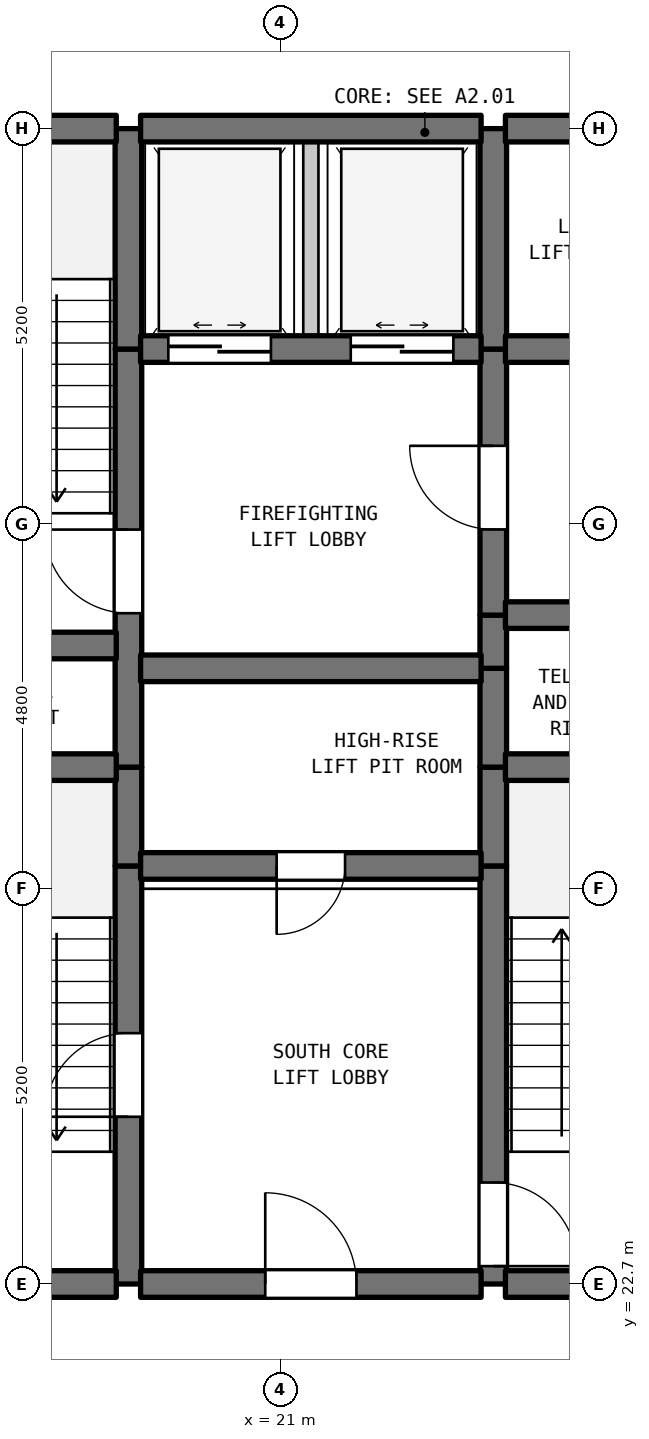
"""IFC4 building model, lengths in metres.
Left out: names, types, materials, properties, quantities, classifications, styles, units other than length and angle.
Written with IfcOpenShell. Run it as: python <this file> out.ifc"""

import sys

from ifc_helpers import new_model, si_unit, direction, frame, frame_2d, origin, place, context, subcontext, project, spatial, rectangle, extrude, element, fill, save


model = new_model("IFC4")
c1 = context("Model", 3, precision=1e-05, world=origin(), true_north=direction((0.0, 1.0)))
c2 = subcontext(c1, "Body", "Model", "MODEL_VIEW")
j1 = project(units=[si_unit("LENGTHUNIT", "METRE"), si_unit("PLANEANGLEUNIT", "RADIAN")], contexts=[c1])
p1 = place(None, origin())
s1 = spatial("IfcSite", under=j1, at=p1, CompositionType="ELEMENT")
p2 = place(p1, origin())
s2 = spatial("IfcBuilding", under=s1, at=p2, CompositionType="ELEMENT")
p3 = place(p2, frame((0.0, 0.0, -9.0)))
s3 = spatial("IfcBuildingStorey", under=s2, at=p3, CompositionType="ELEMENT", Elevation=-9.0)
p4 = place(p3, frame((19.0, 22.7, 0.0), z_axis=(0.0, 0.0, 1.0), x_axis=(0.0, 1.0, 0.0)))
e1 = element("IfcWall", 1, at=p4, inside=s3, PredefinedType="SHEAR", context=c2, shape_type="SweptSolid", body=[
    extrude(rectangle(XDim=5.5, YDim=0.35, at=frame_2d((2.75, 0.0))), origin(), (0.0, 0.0, 1.0), 4.16),
])
p5 = place(p4, frame((2.2, 0.0, 0.0)))
e2 = element("IfcOpeningElement", 2, at=p5, cuts=e1, PredefinedType="OPENING", context=c2, shape_type="SweptSolid", body=[
    extrude(rectangle(XDim=1.1, YDim=2.15, at=frame_2d((0.55, 1.075))), frame((0.0, 0.185, 0.0), z_axis=(0.0, -1.0, 0.0), x_axis=(1.0, 0.0, 0.0)), (0.0, 0.0, 1.0), 0.37),
])
p6 = place(p3, frame((19.0, 28.2, 0.0), z_axis=(0.0, 0.0, 1.0), x_axis=(0.0, 1.0, 0.0)))
e3 = element("IfcWall", 3, at=p6, inside=s3, PredefinedType="SHEAR", context=c2, shape_type="SweptSolid", body=[
    extrude(rectangle(XDim=1.3, YDim=0.35, at=frame_2d((0.65, 0.0))), origin(), (0.0, 0.0, 1.0), 4.16),
])
p7 = place(p3, frame((19.0, 29.5, 0.0), z_axis=(0.0, 0.0, 1.0), x_axis=(0.0, 1.0, 0.0)))
e4 = element("IfcWall", 4, at=p7, inside=s3, PredefinedType="SHEAR", context=c2, shape_type="SweptSolid", body=[
    extrude(rectangle(XDim=5.5, YDim=0.35, at=frame_2d((2.75, 0.0))), origin(), (0.0, 0.0, 1.0), 4.16),
])
p8 = place(p7, frame((2.025, 0.0, 0.0)))
e5 = element("IfcOpeningElement", 5, at=p8, cuts=e4, PredefinedType="OPENING", context=c2, shape_type="SweptSolid", body=[
    extrude(rectangle(XDim=1.1, YDim=2.15, at=frame_2d((0.55, 1.075))), frame((0.0, 0.185, 0.0), z_axis=(0.0, -1.0, 0.0), x_axis=(1.0, 0.0, 0.0)), (0.0, 0.0, 1.0), 0.37),
])
p9 = place(p3, frame((19.0, 35.0, 0.0), z_axis=(0.0, 0.0, 1.0), x_axis=(0.0, 1.0, 0.0)))
e6 = element("IfcWall", 6, at=p9, inside=s3, PredefinedType="SHEAR", context=c2, shape_type="SweptSolid", body=[
    extrude(rectangle(XDim=2.9, YDim=0.35, at=frame_2d((1.45, 0.0))), origin(), (0.0, 0.0, 1.0), 4.16),
])
p10 = place(p3, frame((21.4, 35.0, 0.0), z_axis=(0.0, 0.0, 1.0), x_axis=(0.0, 1.0, 0.0)))
e7 = element("IfcWall", 7, at=p10, inside=s3, PredefinedType="STANDARD", context=c2, shape_type="SweptSolid", body=[
    extrude(rectangle(XDim=2.9, YDim=0.2, at=frame_2d((1.45, 0.0))), origin(), (0.0, 0.0, 1.0), 4.16),
])
p11 = place(p3, frame((23.8, 22.7, 0.0), z_axis=(0.0, 0.0, 1.0), x_axis=(0.0, 1.0, 0.0)))
e8 = element("IfcWall", 8, at=p11, inside=s3, PredefinedType="SHEAR", context=c2, shape_type="SweptSolid", body=[
    extrude(rectangle(XDim=5.5, YDim=0.35, at=frame_2d((2.75, 0.0))), origin(), (0.0, 0.0, 1.0), 4.16),
])
p12 = place(p11, frame((0.235, 0.0, 0.0)))
e9 = element("IfcOpeningElement", 9, at=p12, cuts=e8, PredefinedType="OPENING", context=c2, shape_type="SweptSolid", body=[
    extrude(rectangle(XDim=1.1, YDim=2.15, at=frame_2d((0.55, 1.075))), frame((0.0, 0.185, 0.0), z_axis=(0.0, -1.0, 0.0), x_axis=(1.0, 0.0, 0.0)), (0.0, 0.0, 1.0), 0.37),
])
for number, where, z_axis, x_axis in (
    (10, (23.8, 28.2, 0.0), (0.0, 0.0, 1.0), (0.0, 1.0, 0.0)),
    (11, (23.8, 29.5, 0.0), (0.0, 0.0, 1.0), (0.0, 1.0, 0.0)),
):
    element("IfcWall", number, at=place(p3, frame(where, z_axis=z_axis, x_axis=x_axis)), inside=s3, PredefinedType="SHEAR", context=c2, shape_type="SweptSolid", body=[
        extrude(rectangle(XDim=1.3, YDim=0.35, at=frame_2d((0.65, 0.0))), origin(), (0.0, 0.0, 1.0), 4.16),
    ])
p13 = place(p3, frame((23.8, 30.8, 0.0), z_axis=(0.0, 0.0, 1.0), x_axis=(0.0, 1.0, 0.0)))
e12 = element("IfcWall", 12, at=p13, inside=s3, PredefinedType="SHEAR", context=c2, shape_type="SweptSolid", body=[
    extrude(rectangle(XDim=0.7, YDim=0.35, at=frame_2d((0.35, 0.0))), origin(), (0.0, 0.0, 1.0), 4.16),
])
p14 = place(p3, frame((23.8, 31.5, 0.0), z_axis=(0.0, 0.0, 1.0), x_axis=(0.0, 1.0, 0.0)))
e13 = element("IfcWall", 13, at=p14, inside=s3, PredefinedType="SHEAR", context=c2, shape_type="SweptSolid", body=[
    extrude(rectangle(XDim=3.5, YDim=0.35, at=frame_2d((1.75, 0.0))), origin(), (0.0, 0.0, 1.0), 4.16),
])
p15 = place(p14, frame((1.127, 0.0, 0.0)))
e14 = element("IfcOpeningElement", 14, at=p15, cuts=e13, PredefinedType="OPENING", context=c2, shape_type="SweptSolid", body=[
    extrude(rectangle(XDim=1.1, YDim=2.15, at=frame_2d((0.55, 1.075))), frame((0.0, 0.185, 0.0), z_axis=(0.0, -1.0, 0.0), x_axis=(1.0, 0.0, 0.0)), (0.0, 0.0, 1.0), 0.37),
])
p16 = place(p3, frame((23.8, 35.0, 0.0), z_axis=(0.0, 0.0, 1.0), x_axis=(0.0, 1.0, 0.0)))
e15 = element("IfcWall", 15, at=p16, inside=s3, PredefinedType="SHEAR", context=c2, shape_type="SweptSolid", body=[
    extrude(rectangle(XDim=2.9, YDim=0.35, at=frame_2d((1.45, 0.0))), origin(), (0.0, 0.0, 1.0), 4.16),
])
p17 = place(p3, frame((15.16, 22.7, 0.0), z_axis=(0.0, 0.0, 1.0), x_axis=(1.0, 0.0, 0.0)))
e16 = element("IfcWall", 16, at=p17, inside=s3, PredefinedType="SHEAR", context=c2, shape_type="SweptSolid", body=[
    extrude(rectangle(XDim=3.68, YDim=0.35, at=frame_2d((1.84, 0.0))), origin(), (0.0, 0.0, 1.0), 4.16),
])
p18 = place(p3, frame((19.16, 22.7, 0.0), z_axis=(0.0, 0.0, 1.0), x_axis=(1.0, 0.0, 0.0)))
e17 = element("IfcWall", 17, at=p18, inside=s3, PredefinedType="SHEAR", context=c2, shape_type="SweptSolid", body=[
    extrude(rectangle(XDim=4.48, YDim=0.35, at=frame_2d((2.24, 0.0))), origin(), (0.0, 0.0, 1.0), 4.16),
])
p19 = place(p18, frame((1.64, 0.0, 0.0)))
e18 = element("IfcOpeningElement", 18, at=p19, cuts=e17, PredefinedType="OPENING", context=c2, shape_type="SweptSolid", body=[
    extrude(rectangle(XDim=1.2, YDim=2.2, at=frame_2d((0.6, 1.1))), frame((0.0, 0.185, 0.0), z_axis=(0.0, -1.0, 0.0), x_axis=(1.0, 0.0, 0.0)), (0.0, 0.0, 1.0), 0.37),
])
p20 = place(p3, frame((23.96, 22.7, 0.0), z_axis=(0.0, 0.0, 1.0), x_axis=(1.0, 0.0, 0.0)))
e19 = element("IfcWall", 19, at=p20, inside=s3, PredefinedType="SHEAR", context=c2, shape_type="SweptSolid", body=[
    extrude(rectangle(XDim=3.18, YDim=0.35, at=frame_2d((1.59, 0.0))), origin(), (0.0, 0.0, 1.0), 4.16),
])
p21 = place(p3, frame((19.16, 28.2, 0.0), z_axis=(0.0, 0.0, 1.0), x_axis=(1.0, 0.0, 0.0)))
e20 = element("IfcWall", 20, at=p21, inside=s3, PredefinedType="SHEAR", context=c2, shape_type="SweptSolid", body=[
    extrude(rectangle(XDim=4.48, YDim=0.35, at=frame_2d((2.24, 0.0))), origin(), (0.0, 0.0, 1.0), 4.16),
])
p22 = place(p21, frame((1.79, 0.0, 0.0)))
e21 = element("IfcOpeningElement", 21, at=p22, cuts=e20, PredefinedType="OPENING", context=c2, shape_type="SweptSolid", body=[
    extrude(rectangle(XDim=0.9, YDim=2.15, at=frame_2d((0.45, 1.075))), frame((0.0, 0.185, 0.0), z_axis=(0.0, -1.0, 0.0), x_axis=(1.0, 0.0, 0.0)), (0.0, 0.0, 1.0), 0.37),
])
p23 = place(p3, frame((15.16, 29.5, 0.0), z_axis=(0.0, 0.0, 1.0), x_axis=(1.0, 0.0, 0.0)))
e22 = element("IfcWall", 22, at=p23, inside=s3, PredefinedType="SHEAR", context=c2, shape_type="SweptSolid", body=[
    extrude(rectangle(XDim=3.68, YDim=0.35, at=frame_2d((1.84, 0.0))), origin(), (0.0, 0.0, 1.0), 4.16),
])
p24 = place(p3, frame((23.96, 29.5, 0.0), z_axis=(0.0, 0.0, 1.0), x_axis=(1.0, 0.0, 0.0)))
e23 = element("IfcWall", 23, at=p24, inside=s3, PredefinedType="SHEAR", context=c2, shape_type="SweptSolid", body=[
    extrude(rectangle(XDim=3.18, YDim=0.35, at=frame_2d((1.59, 0.0))), origin(), (0.0, 0.0, 1.0), 4.16),
])
p25 = place(p3, frame((19.16, 30.8, 0.0), z_axis=(0.0, 0.0, 1.0), x_axis=(1.0, 0.0, 0.0)))
e24 = element("IfcWall", 24, at=p25, inside=s3, PredefinedType="SHEAR", context=c2, shape_type="SweptSolid", body=[
    extrude(rectangle(XDim=4.48, YDim=0.35, at=frame_2d((2.24, 0.0))), origin(), (0.0, 0.0, 1.0), 4.16),
])
p26 = place(p3, frame((15.16, 31.1, 0.0), z_axis=(0.0, 0.0, 1.0), x_axis=(1.0, 0.0, 0.0)))
e25 = element("IfcWall", 25, at=p26, inside=s3, PredefinedType="SHEAR", context=c2, shape_type="SweptSolid", body=[
    extrude(rectangle(XDim=3.68, YDim=0.35, at=frame_2d((1.84, 0.0))), origin(), (0.0, 0.0, 1.0), 4.16),
])
p27 = place(p3, frame((23.96, 31.5, 0.0), z_axis=(0.0, 0.0, 1.0), x_axis=(1.0, 0.0, 0.0)))
e26 = element("IfcWall", 26, at=p27, inside=s3, PredefinedType="SHEAR", context=c2, shape_type="SweptSolid", body=[
    extrude(rectangle(XDim=6.68, YDim=0.35, at=frame_2d((3.34, 0.0))), origin(), (0.0, 0.0, 1.0), 4.16),
])
p28 = place(p27, frame((1.24, 0.0, 0.0)))
e27 = element("IfcOpeningElement", 27, at=p28, cuts=e26, PredefinedType="OPENING", context=c2, shape_type="SweptSolid", body=[
    extrude(rectangle(XDim=0.85, YDim=2.1, at=frame_2d((0.425, 1.05))), frame((0.0, 0.185, 0.0), z_axis=(0.0, -1.0, 0.0), x_axis=(1.0, 0.0, 0.0)), (0.0, 0.0, 1.0), 0.37),
])
p29 = place(p3, frame((19.16, 35.0, 0.0), z_axis=(0.0, 0.0, 1.0), x_axis=(1.0, 0.0, 0.0)))
e28 = element("IfcWall", 28, at=p29, inside=s3, PredefinedType="SHEAR", context=c2, shape_type="SweptSolid", body=[
    extrude(rectangle(XDim=4.48, YDim=0.35, at=frame_2d((2.24, 0.0))), origin(), (0.0, 0.0, 1.0), 4.16),
])
p30 = place(p29, frame((0.365, 0.0, 0.0)))
e29 = element("IfcOpeningElement", 29, at=p30, cuts=e28, PredefinedType="OPENING", context=c2, shape_type="SweptSolid", body=[
    extrude(rectangle(XDim=1.35, YDim=2.2, at=frame_2d((0.675, 1.1))), frame((0.0, 0.185, 0.0), z_axis=(0.0, -1.0, 0.0), x_axis=(1.0, 0.0, 0.0)), (0.0, 0.0, 1.0), 0.37),
])
p31 = place(p29, frame((2.765, 0.0, 0.0)))
e30 = element("IfcOpeningElement", 30, at=p31, cuts=e28, PredefinedType="OPENING", context=c2, shape_type="SweptSolid", body=[
    extrude(rectangle(XDim=1.35, YDim=2.2, at=frame_2d((0.675, 1.1))), frame((0.0, 0.185, 0.0), z_axis=(0.0, -1.0, 0.0), x_axis=(1.0, 0.0, 0.0)), (0.0, 0.0, 1.0), 0.37),
])
p32 = place(p3, frame((23.96, 35.0, 0.0), z_axis=(0.0, 0.0, 1.0), x_axis=(1.0, 0.0, 0.0)))
e31 = element("IfcWall", 31, at=p32, inside=s3, PredefinedType="SHEAR", context=c2, shape_type="SweptSolid", body=[
    extrude(rectangle(XDim=6.68, YDim=0.35, at=frame_2d((3.34, 0.0))), origin(), (0.0, 0.0, 1.0), 4.16),
])
p33 = place(p32, frame((2.794, 0.0, 0.0)))
e32 = element("IfcOpeningElement", 32, at=p33, cuts=e31, PredefinedType="OPENING", context=c2, shape_type="SweptSolid", body=[
    extrude(rectangle(XDim=0.95, YDim=2.15, at=frame_2d((0.475, 1.075))), frame((0.0, 0.185, 0.0), z_axis=(0.0, -1.0, 0.0), x_axis=(1.0, 0.0, 0.0)), (0.0, 0.0, 1.0), 0.37),
])
p34 = place(p3, frame((15.16, 37.9, 0.0), z_axis=(0.0, 0.0, 1.0), x_axis=(1.0, 0.0, 0.0)))
e33 = element("IfcWall", 33, at=p34, inside=s3, PredefinedType="SHEAR", context=c2, shape_type="SweptSolid", body=[
    extrude(rectangle(XDim=3.68, YDim=0.35, at=frame_2d((1.84, 0.0))), origin(), (0.0, 0.0, 1.0), 4.16),
])
p35 = place(p3, frame((19.16, 37.9, 0.0), z_axis=(0.0, 0.0, 1.0), x_axis=(1.0, 0.0, 0.0)))
e34 = element("IfcWall", 34, at=p35, inside=s3, PredefinedType="SHEAR", context=c2, shape_type="SweptSolid", body=[
    extrude(rectangle(XDim=4.48, YDim=0.35, at=frame_2d((2.24, 0.0))), origin(), (0.0, 0.0, 1.0), 4.16),
])
p36 = place(p3, frame((23.96, 37.9, 0.0), z_axis=(0.0, 0.0, 1.0), x_axis=(1.0, 0.0, 0.0)))
e35 = element("IfcWall", 35, at=p36, inside=s3, PredefinedType="SHEAR", context=c2, shape_type="SweptSolid", body=[
    extrude(rectangle(XDim=6.68, YDim=0.35, at=frame_2d((3.34, 0.0))), origin(), (0.0, 0.0, 1.0), 4.16),
])
p37 = place(p5, origin())
e36 = element("IfcDoor", 36, at=p37, inside=s3, OperationType="SINGLE_SWING_LEFT", PredefinedType="DOOR", context=c2, shape_type="SweptSolid", body=[
    extrude(rectangle(XDim=1.1, YDim=2.15, at=frame_2d((0.55, 1.075))), frame((0.0, 0.025, 0.0), z_axis=(0.0, -1.0, 0.0), x_axis=(1.0, 0.0, 0.0)), (0.0, 0.0, 1.0), 0.05),
])
fill(e2, e36)
p38 = place(p8, origin())
e37 = element("IfcDoor", 37, at=p38, inside=s3, OperationType="SINGLE_SWING_RIGHT", PredefinedType="DOOR", context=c2, shape_type="SweptSolid", body=[
    extrude(rectangle(XDim=1.1, YDim=2.15, at=frame_2d((0.55, 1.075))), frame((0.0, 0.025, 0.0), z_axis=(0.0, -1.0, 0.0), x_axis=(1.0, 0.0, 0.0)), (0.0, 0.0, 1.0), 0.05),
])
fill(e5, e37)
p39 = place(p12, frame((1.1, 0.0, 0.0), z_axis=(0.0, 0.0, 1.0), x_axis=(-1.0, 0.0, 0.0)))
e38 = element("IfcDoor", 38, at=p39, inside=s3, OperationType="SINGLE_SWING_LEFT", PredefinedType="DOOR", context=c2, shape_type="SweptSolid", body=[
    extrude(rectangle(XDim=1.1, YDim=2.15, at=frame_2d((0.55, 1.075))), frame((0.0, 0.025, 0.0), z_axis=(0.0, -1.0, 0.0), x_axis=(1.0, 0.0, 0.0)), (0.0, 0.0, 1.0), 0.05),
])
fill(e9, e38)
p40 = place(p15, origin())
e39 = element("IfcDoor", 39, at=p40, inside=s3, OperationType="SINGLE_SWING_RIGHT", PredefinedType="DOOR", context=c2, shape_type="SweptSolid", body=[
    extrude(rectangle(XDim=1.1, YDim=2.15, at=frame_2d((0.55, 1.075))), frame((0.0, 0.025, 0.0), z_axis=(0.0, -1.0, 0.0), x_axis=(1.0, 0.0, 0.0)), (0.0, 0.0, 1.0), 0.05),
])
fill(e14, e39)
p41 = place(p19, origin())
e40 = element("IfcDoor", 40, at=p41, inside=s3, OperationType="SINGLE_SWING_LEFT", PredefinedType="DOOR", context=c2, shape_type="SweptSolid", body=[
    extrude(rectangle(XDim=1.2, YDim=2.2, at=frame_2d((0.6, 1.1))), frame((0.0, 0.025, 0.0), z_axis=(0.0, -1.0, 0.0), x_axis=(1.0, 0.0, 0.0)), (0.0, 0.0, 1.0), 0.05),
])
fill(e18, e40)
p42 = place(p22, frame((0.9, 0.0, 0.0), z_axis=(0.0, 0.0, 1.0), x_axis=(-1.0, 0.0, 0.0)))
e41 = element("IfcDoor", 41, at=p42, inside=s3, OperationType="SINGLE_SWING_LEFT", PredefinedType="DOOR", context=c2, shape_type="SweptSolid", body=[
    extrude(rectangle(XDim=0.9, YDim=2.15, at=frame_2d((0.45, 1.075))), frame((0.0, 0.025, 0.0), z_axis=(0.0, -1.0, 0.0), x_axis=(1.0, 0.0, 0.0)), (0.0, 0.0, 1.0), 0.05),
])
fill(e21, e41)
p43 = place(p30, origin())
e42 = element("IfcDoor", 42, at=p43, inside=s3, OperationType="DOUBLE_DOOR_SLIDING", PredefinedType="DOOR", context=c2, shape_type="SweptSolid", body=[
    extrude(rectangle(XDim=1.35, YDim=2.2, at=frame_2d((0.675, 1.1))), frame((0.0, 0.025, 0.0), z_axis=(0.0, -1.0, 0.0), x_axis=(1.0, 0.0, 0.0)), (0.0, 0.0, 1.0), 0.05),
])
fill(e29, e42)
p44 = place(p31, origin())
e43 = element("IfcDoor", 43, at=p44, inside=s3, OperationType="DOUBLE_DOOR_SLIDING", PredefinedType="DOOR", context=c2, shape_type="SweptSolid", body=[
    extrude(rectangle(XDim=1.35, YDim=2.2, at=frame_2d((0.675, 1.1))), frame((0.0, 0.025, 0.0), z_axis=(0.0, -1.0, 0.0), x_axis=(1.0, 0.0, 0.0)), (0.0, 0.0, 1.0), 0.05),
])
fill(e30, e43)
save(model, sys.argv[1])
